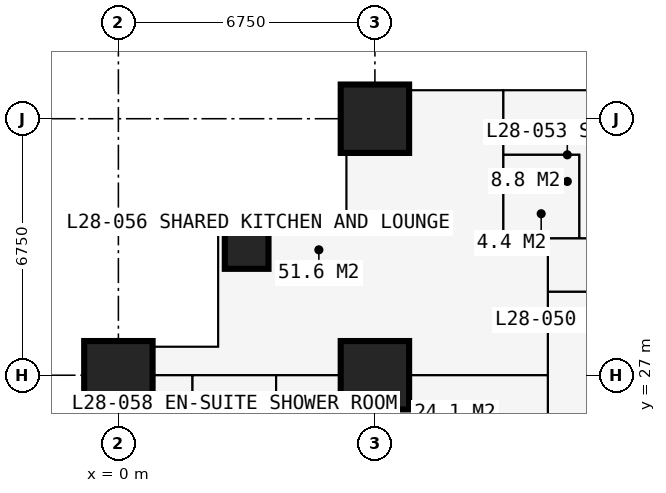
"""IFC4 building model, lengths in metres.
Left out: names, types, materials, properties, quantities, classifications, styles, units other than length and angle.
Written with IfcOpenShell. Run it as: python <this file> out.ifc"""

import sys

from ifc_helpers import new_model, si_unit, direction, frame, frame_2d, origin, origin_2d, place, context, subcontext, project, spatial, rectangle, extrude, element, fill, save


model = new_model("IFC4")
c1 = context("Model", 3, precision=1e-05, world=origin(), true_north=direction((0.0, 1.0)))
c2 = subcontext(c1, "Body", "Model", "MODEL_VIEW")
j1 = project(units=[si_unit("LENGTHUNIT", "METRE"), si_unit("PLANEANGLEUNIT", "RADIAN")], contexts=[c1])
p1 = place(None, origin())
s1 = spatial("IfcSite", under=j1, at=p1, CompositionType="ELEMENT")
p2 = place(p1, origin())
s2 = spatial("IfcBuilding", under=s1, at=p2, CompositionType="ELEMENT")
p3 = place(p2, frame((0.0, 0.0, 105.3)))
s3 = spatial("IfcBuildingStorey", under=s2, at=p3, CompositionType="ELEMENT", Elevation=105.3)
p4 = place(p3, frame((0.0, 27.0, 0.0), z_axis=(0.0, 0.0, 1.0), x_axis=(1.0, 0.0, 0.0)))
e1 = element("IfcColumn", 1, at=p4, inside=s3, PredefinedType="COLUMN", context=c2, shape_type="SweptSolid", body=[
    extrude(rectangle(XDim=1.8, YDim=1.8, at=origin_2d()), origin(), (0.0, 0.0, 1.0), 3.6),
])
p5 = place(p3, frame((3.375, 30.375, 0.0), z_axis=(0.0, 0.0, 1.0), x_axis=(1.0, 0.0, 0.0)))
e2 = element("IfcColumn", 2, at=p5, inside=s3, PredefinedType="COLUMN", context=c2, shape_type="SweptSolid", body=[
    extrude(rectangle(XDim=1.15, YDim=1.15, at=origin_2d()), origin(), (0.0, 0.0, 1.0), 3.6),
])
for number, where, z_axis, x_axis in (
    (3, (6.75, 27.0, 0.0), (0.0, 0.0, 1.0), (1.0, 0.0, 0.0)),
    (4, (6.75, 33.75, 0.0), (0.0, 0.0, 1.0), (1.0, 0.0, 0.0)),
):
    element("IfcColumn", number, at=place(p3, frame(where, z_axis=z_axis, x_axis=x_axis)), inside=s3, PredefinedType="COLUMN", context=c2, shape_type="SweptSolid", body=[
        extrude(rectangle(XDim=1.8, YDim=1.8, at=origin_2d()), origin(), (0.0, 0.0, 1.0), 3.6),
    ])
p6 = place(p3, frame((6.0, 34.5, 0.0), z_axis=(0.0, 0.0, 1.0), x_axis=(0.0, -1.0, 0.0)))
e5 = element("IfcWall", 5, at=p6, inside=s3, PredefinedType="SOLIDWALL", context=c2, shape_type="SweptSolid", body=[
    extrude(rectangle(XDim=3.375, YDim=0.3, at=frame_2d((1.688, 0.0))), origin(), (0.0, 0.0, 1.0), 3.375),
])
p7 = place(p6, frame((1.833, 0.0, 0.9)))
e6 = element("IfcOpeningElement", 6, at=p7, cuts=e5, PredefinedType="OPENING", context=c2, shape_type="SweptSolid", body=[
    extrude(rectangle(XDim=1.2, YDim=1.8, at=frame_2d((0.6, 0.9))), frame((0.0, 0.16, 0.0), z_axis=(0.0, -1.0, 0.0), x_axis=(1.0, 0.0, 0.0)), (0.0, 0.0, 1.0), 0.32),
])
p8 = place(p3, frame((6.0, 31.125, 0.0), z_axis=(0.0, 0.0, 1.0), x_axis=(-1.0, 0.0, 0.0)))
e7 = element("IfcWall", 7, at=p8, inside=s3, PredefinedType="SOLIDWALL", context=c2, shape_type="SweptSolid", body=[
    extrude(rectangle(XDim=3.375, YDim=0.3, at=frame_2d((1.688, 0.0))), origin(), (0.0, 0.0, 1.0), 3.375),
])
p9 = place(p8, frame((0.788, 0.0, 0.6)))
e8 = element("IfcOpeningElement", 8, at=p9, cuts=e7, PredefinedType="OPENING", context=c2, shape_type="SweptSolid", body=[
    extrude(rectangle(XDim=1.8, YDim=2.1, at=frame_2d((0.9, 1.05))), frame((0.0, 0.16, 0.0), z_axis=(0.0, -1.0, 0.0), x_axis=(1.0, 0.0, 0.0)), (0.0, 0.0, 1.0), 0.32),
])
p10 = place(p3, frame((2.625, 31.125, 0.0), z_axis=(0.0, 0.0, 1.0), x_axis=(0.0, -1.0, 0.0)))
e9 = element("IfcWall", 9, at=p10, inside=s3, PredefinedType="SOLIDWALL", context=c2, shape_type="SweptSolid", body=[
    extrude(rectangle(XDim=3.375, YDim=0.3, at=frame_2d((1.688, 0.0))), origin(), (0.0, 0.0, 1.0), 3.375),
])
p11 = place(p10, frame((0.788, 0.0, 0.6)))
e10 = element("IfcOpeningElement", 10, at=p11, cuts=e9, PredefinedType="OPENING", context=c2, shape_type="SweptSolid", body=[
    extrude(rectangle(XDim=1.8, YDim=2.1, at=frame_2d((0.9, 1.05))), frame((0.0, 0.16, 0.0), z_axis=(0.0, -1.0, 0.0), x_axis=(1.0, 0.0, 0.0)), (0.0, 0.0, 1.0), 0.32),
])
p12 = place(p3, frame((2.625, 27.75, 0.0), z_axis=(0.0, 0.0, 1.0), x_axis=(-1.0, 0.0, 0.0)))
e11 = element("IfcWall", 11, at=p12, inside=s3, PredefinedType="SOLIDWALL", context=c2, shape_type="SweptSolid", body=[
    extrude(rectangle(XDim=3.375, YDim=0.3, at=frame_2d((1.688, 0.0))), origin(), (0.0, 0.0, 1.0), 3.375),
])
p13 = place(p12, frame((0.343, 0.0, 0.9)))
e12 = element("IfcOpeningElement", 12, at=p13, cuts=e11, PredefinedType="OPENING", context=c2, shape_type="SweptSolid", body=[
    extrude(rectangle(XDim=1.2, YDim=1.8, at=frame_2d((0.6, 0.9))), frame((0.0, 0.16, 0.0), z_axis=(0.0, -1.0, 0.0), x_axis=(1.0, 0.0, 0.0)), (0.0, 0.0, 1.0), 0.32),
])
p14 = place(p3, frame((-0.734, 27.0, 0.0), z_axis=(0.0, 0.0, 1.0), x_axis=(1.0, 0.0, 0.0)))
e13 = element("IfcWall", 13, at=p14, inside=s3, PredefinedType="PARTITIONING", context=c2, shape_type="SweptSolid", body=[
    extrude(rectangle(XDim=12.034, YDim=0.15, at=frame_2d((6.017, 0.0))), origin(), (0.0, 0.0, 1.0), 2.806),
])
p15 = place(p14, frame((8.434, 0.0, 0.0)))
e14 = element("IfcOpeningElement", 14, at=p15, cuts=e13, PredefinedType="OPENING", context=c2, shape_type="SweptSolid", body=[
    extrude(rectangle(XDim=1.0, YDim=2.2, at=frame_2d((0.5, 1.1))), frame((0.0, 0.085, 0.0), z_axis=(0.0, -1.0, 0.0), x_axis=(1.0, 0.0, 0.0)), (0.0, 0.0, 1.0), 0.17),
])
p16 = place(p3, frame((1.95, 25.0, 0.0), z_axis=(0.0, 0.0, 1.0), x_axis=(0.0, 1.0, 0.0)))
e15 = element("IfcWall", 15, at=p16, inside=s3, PredefinedType="PARTITIONING", context=c2, shape_type="SweptSolid", body=[
    extrude(rectangle(XDim=2.0, YDim=0.1, at=frame_2d((1.0, 0.0))), origin(), (0.0, 0.0, 1.0), 3.375),
])
p17 = place(p3, frame((4.15, 10.125, 0.0), z_axis=(0.0, 0.0, 1.0), x_axis=(0.0, 1.0, 0.0)))
e16 = element("IfcWall", 16, at=p17, inside=s3, PredefinedType="PARTITIONING", context=c2, shape_type="SweptSolid", body=[
    extrude(rectangle(XDim=16.875, YDim=0.1, at=frame_2d((8.438, 0.0))), origin(), (0.0, 0.0, 1.0), 3.375),
])
p18 = place(p17, frame((13.7, 0.0, 0.0)))
e17 = element("IfcOpeningElement", 17, at=p18, cuts=e16, PredefinedType="OPENING", context=c2, shape_type="SweptSolid", body=[
    extrude(rectangle(XDim=0.95, YDim=2.2, at=frame_2d((0.475, 1.1))), frame((0.0, 0.06, 0.0), z_axis=(0.0, -1.0, 0.0), x_axis=(1.0, 0.0, 0.0)), (0.0, 0.0, 1.0), 0.12),
])
p19 = place(p17, frame((0.2, 0.0, 0.0)))
e18 = element("IfcOpeningElement", 18, at=p19, cuts=e16, PredefinedType="OPENING", context=c2, shape_type="SweptSolid", body=[
    extrude(rectangle(XDim=0.95, YDim=2.2, at=frame_2d((0.475, 1.1))), frame((0.0, 0.06, 0.0), z_axis=(0.0, -1.0, 0.0), x_axis=(1.0, 0.0, 0.0)), (0.0, 0.0, 1.0), 0.12),
])
p20 = place(p17, frame((3.625, 0.0, 0.0)))
e19 = element("IfcOpeningElement", 19, at=p20, cuts=e16, PredefinedType="OPENING", context=c2, shape_type="SweptSolid", body=[
    extrude(rectangle(XDim=0.95, YDim=2.2, at=frame_2d((0.475, 1.1))), frame((0.0, 0.06, 0.0), z_axis=(0.0, -1.0, 0.0), x_axis=(1.0, 0.0, 0.0)), (0.0, 0.0, 1.0), 0.12),
])
p21 = place(p17, frame((7.0, 0.0, 0.0)))
e20 = element("IfcOpeningElement", 20, at=p21, cuts=e16, PredefinedType="OPENING", context=c2, shape_type="SweptSolid", body=[
    extrude(rectangle(XDim=0.95, YDim=2.2, at=frame_2d((0.475, 1.1))), frame((0.0, 0.06, 0.0), z_axis=(0.0, -1.0, 0.0), x_axis=(1.0, 0.0, 0.0)), (0.0, 0.0, 1.0), 0.12),
])
p22 = place(p17, frame((10.375, 0.0, 0.0)))
e21 = element("IfcOpeningElement", 21, at=p22, cuts=e16, PredefinedType="OPENING", context=c2, shape_type="SweptSolid", body=[
    extrude(rectangle(XDim=0.95, YDim=2.2, at=frame_2d((0.475, 1.1))), frame((0.0, 0.06, 0.0), z_axis=(0.0, -1.0, 0.0), x_axis=(1.0, 0.0, 0.0)), (0.0, 0.0, 1.0), 0.12),
])
p23 = place(p3, frame((10.125, 30.6, 0.0), z_axis=(0.0, 0.0, 1.0), x_axis=(0.0, 1.0, 0.0)))
e22 = element("IfcWall", 22, at=p23, inside=s3, PredefinedType="PARTITIONING", context=c2, shape_type="SweptSolid", body=[
    extrude(rectangle(XDim=3.884, YDim=0.1, at=frame_2d((1.942, 0.0))), origin(), (0.0, 0.0, 1.0), 3.375),
])
p24 = place(p3, frame((10.125, 30.6, 0.0), z_axis=(0.0, 0.0, 1.0), x_axis=(1.0, 0.0, 0.0)))
e23 = element("IfcWall", 23, at=p24, inside=s3, PredefinedType="PARTITIONING", context=c2, shape_type="SweptSolid", body=[
    extrude(rectangle(XDim=3.375, YDim=0.1, at=frame_2d((1.688, 0.0))), origin(), (0.0, 0.0, 1.0), 3.375),
])
p25 = place(p24, frame((2.2, 0.0, 0.0)))
e24 = element("IfcOpeningElement", 24, at=p25, cuts=e23, PredefinedType="OPENING", context=c2, shape_type="SweptSolid", body=[
    extrude(rectangle(XDim=0.95, YDim=2.2, at=frame_2d((0.475, 1.1))), frame((0.0, 0.06, 0.0), z_axis=(0.0, -1.0, 0.0), x_axis=(1.0, 0.0, 0.0)), (0.0, 0.0, 1.0), 0.12),
])
p26 = place(p3, frame((10.125, 32.8, 0.0), z_axis=(0.0, 0.0, 1.0), x_axis=(1.0, 0.0, 0.0)))
e25 = element("IfcWall", 25, at=p26, inside=s3, PredefinedType="PARTITIONING", context=c2, shape_type="SweptSolid", body=[
    extrude(rectangle(XDim=2.0, YDim=0.1, at=frame_2d((1.0, 0.0))), origin(), (0.0, 0.0, 1.0), 3.375),
])
p27 = place(p3, frame((11.3, 11.3, 0.0), z_axis=(0.0, 0.0, 1.0), x_axis=(0.0, 1.0, 0.0)))
e26 = element("IfcWall", 26, at=p27, inside=s3, PredefinedType="PARTITIONING", context=c2, shape_type="SweptSolid", body=[
    extrude(rectangle(XDim=19.3, YDim=0.15, at=frame_2d((9.65, 0.0))), origin(), (0.0, 0.0, 1.0), 3.375),
])
p28 = place(p27, frame((13.525, 0.0, 0.0)))
e27 = element("IfcOpeningElement", 27, at=p28, cuts=e26, PredefinedType="OPENING", context=c2, shape_type="SweptSolid", body=[
    extrude(rectangle(XDim=1.0, YDim=2.2, at=frame_2d((0.5, 1.1))), frame((0.0, 0.085, 0.0), z_axis=(0.0, -1.0, 0.0), x_axis=(1.0, 0.0, 0.0)), (0.0, 0.0, 1.0), 0.17),
])
p29 = place(p27, frame((10.438, 0.0, 0.0)))
e28 = element("IfcOpeningElement", 28, at=p29, cuts=e26, PredefinedType="OPENING", context=c2, shape_type="SweptSolid", body=[
    extrude(rectangle(XDim=1.0, YDim=2.2, at=frame_2d((0.5, 1.1))), frame((0.0, 0.085, 0.0), z_axis=(0.0, -1.0, 0.0), x_axis=(1.0, 0.0, 0.0)), (0.0, 0.0, 1.0), 0.17),
])
p30 = place(p3, frame((11.3, 29.2, 0.0), z_axis=(0.0, 0.0, 1.0), x_axis=(1.0, 0.0, 0.0)))
e29 = element("IfcWall", 29, at=p30, inside=s3, PredefinedType="PARTITIONING", context=c2, shape_type="SweptSolid", body=[
    extrude(rectangle(XDim=19.075, YDim=0.1, at=frame_2d((9.538, 0.0))), origin(), (0.0, 0.0, 1.0), 3.375),
])
p31 = place(p30, frame((6.4, 0.0, 0.0)))
e30 = element("IfcOpeningElement", 30, at=p31, cuts=e29, PredefinedType="OPENING", context=c2, shape_type="SweptSolid", body=[
    extrude(rectangle(XDim=0.95, YDim=2.2, at=frame_2d((0.475, 1.1))), frame((0.0, 0.06, 0.0), z_axis=(0.0, -1.0, 0.0), x_axis=(1.0, 0.0, 0.0)), (0.0, 0.0, 1.0), 0.12),
])
p32 = place(p30, frame((13.15, 0.0, 0.0)))
e31 = element("IfcOpeningElement", 31, at=p32, cuts=e29, PredefinedType="OPENING", context=c2, shape_type="SweptSolid", body=[
    extrude(rectangle(XDim=0.95, YDim=2.2, at=frame_2d((0.475, 1.1))), frame((0.0, 0.06, 0.0), z_axis=(0.0, -1.0, 0.0), x_axis=(1.0, 0.0, 0.0)), (0.0, 0.0, 1.0), 0.12),
])
p33 = place(p30, frame((0.6, 0.0, 0.0)))
e32 = element("IfcOpeningElement", 32, at=p33, cuts=e29, PredefinedType="OPENING", context=c2, shape_type="SweptSolid", body=[
    extrude(rectangle(XDim=1.0, YDim=2.2, at=frame_2d((0.5, 1.1))), frame((0.0, 0.06, 0.0), z_axis=(0.0, -1.0, 0.0), x_axis=(1.0, 0.0, 0.0)), (0.0, 0.0, 1.0), 0.12),
])
p34 = place(p3, frame((12.125, 30.6, 0.0), z_axis=(0.0, 0.0, 1.0), x_axis=(0.0, 1.0, 0.0)))
e33 = element("IfcWall", 33, at=p34, inside=s3, PredefinedType="PARTITIONING", context=c2, shape_type="SweptSolid", body=[
    extrude(rectangle(XDim=2.2, YDim=0.1, at=frame_2d((1.1, 0.0))), origin(), (0.0, 0.0, 1.0), 3.375),
])
p35 = place(p34, frame((0.65, 0.0, 0.0)))
e34 = element("IfcOpeningElement", 34, at=p35, cuts=e33, PredefinedType="OPENING", context=c2, shape_type="SweptSolid", body=[
    extrude(rectangle(XDim=0.9, YDim=2.2, at=frame_2d((0.45, 1.1))), frame((0.0, 0.06, 0.0), z_axis=(0.0, -1.0, 0.0), x_axis=(1.0, 0.0, 0.0)), (0.0, 0.0, 1.0), 0.12),
])
p36 = place(p7, origin())
e35 = element("IfcWindow", 35, at=p36, inside=s3, PartitioningType="SINGLE_PANEL", PredefinedType="WINDOW", context=c2, shape_type="SweptSolid", body=[
    extrude(rectangle(XDim=1.2, YDim=1.8, at=frame_2d((0.6, 0.9))), frame((0.0, 0.03, 0.0), z_axis=(0.0, -1.0, 0.0), x_axis=(1.0, 0.0, 0.0)), (0.0, 0.0, 1.0), 0.06),
])
fill(e6, e35)
p37 = place(p9, origin())
e36 = element("IfcWindow", 36, at=p37, inside=s3, PartitioningType="SINGLE_PANEL", PredefinedType="WINDOW", context=c2, shape_type="SweptSolid", body=[
    extrude(rectangle(XDim=1.8, YDim=2.1, at=frame_2d((0.9, 1.05))), frame((0.0, 0.03, 0.0), z_axis=(0.0, -1.0, 0.0), x_axis=(1.0, 0.0, 0.0)), (0.0, 0.0, 1.0), 0.06),
])
fill(e8, e36)
p38 = place(p11, origin())
e37 = element("IfcWindow", 37, at=p38, inside=s3, PartitioningType="SINGLE_PANEL", PredefinedType="WINDOW", context=c2, shape_type="SweptSolid", body=[
    extrude(rectangle(XDim=1.8, YDim=2.1, at=frame_2d((0.9, 1.05))), frame((0.0, 0.03, 0.0), z_axis=(0.0, -1.0, 0.0), x_axis=(1.0, 0.0, 0.0)), (0.0, 0.0, 1.0), 0.06),
])
fill(e10, e37)
p39 = place(p13, origin())
e38 = element("IfcWindow", 38, at=p39, inside=s3, PartitioningType="SINGLE_PANEL", PredefinedType="WINDOW", context=c2, shape_type="SweptSolid", body=[
    extrude(rectangle(XDim=1.2, YDim=1.8, at=frame_2d((0.6, 0.9))), frame((0.0, 0.03, 0.0), z_axis=(0.0, -1.0, 0.0), x_axis=(1.0, 0.0, 0.0)), (0.0, 0.0, 1.0), 0.06),
])
fill(e12, e38)
p40 = place(p35, origin())
e39 = element("IfcDoor", 39, at=p40, inside=s3, OperationType="SINGLE_SWING_RIGHT", PredefinedType="DOOR", context=c2, shape_type="SweptSolid", body=[
    extrude(rectangle(XDim=0.9, YDim=2.2, at=frame_2d((0.45, 1.1))), frame((0.0, 0.025, 0.0), z_axis=(0.0, -1.0, 0.0), x_axis=(1.0, 0.0, 0.0)), (0.0, 0.0, 1.0), 0.05),
])
fill(e34, e39)
p41 = place(p33, origin())
e40 = element("IfcDoor", 40, at=p41, inside=s3, OperationType="SINGLE_SWING_LEFT", PredefinedType="DOOR", context=c2, shape_type="SweptSolid", body=[
    extrude(rectangle(XDim=1.0, YDim=2.2, at=frame_2d((0.5, 1.1))), frame((0.0, 0.025, 0.0), z_axis=(0.0, -1.0, 0.0), x_axis=(1.0, 0.0, 0.0)), (0.0, 0.0, 1.0), 0.05),
])
fill(e32, e40)
p42 = place(p15, origin())
e41 = element("IfcDoor", 41, at=p42, inside=s3, OperationType="SINGLE_SWING_LEFT", PredefinedType="DOOR", context=c2, shape_type="SweptSolid", body=[
    extrude(rectangle(XDim=1.0, YDim=2.2, at=frame_2d((0.5, 1.1))), frame((0.0, 0.025, 0.0), z_axis=(0.0, -1.0, 0.0), x_axis=(1.0, 0.0, 0.0)), (0.0, 0.0, 1.0), 0.05),
])
fill(e14, e41)
save(model, sys.argv[1])
